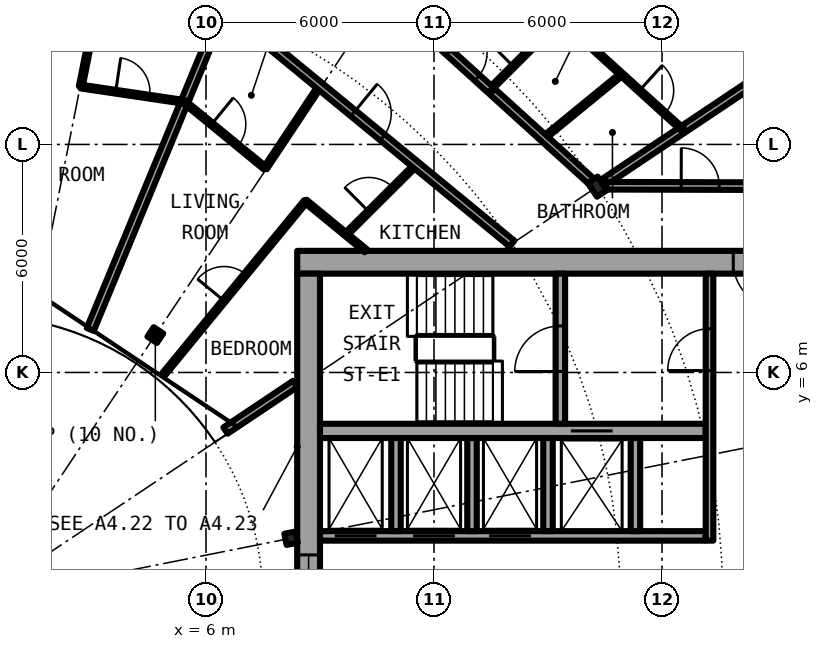
"""IFC4 building model, lengths in metres.
Left out: names, types, materials, properties, quantities, classifications, styles, units other than length and angle.
Written with IfcOpenShell. Run it as: python <this file> out.ifc"""

import sys

from ifc_helpers import new_model, si_unit, direction, frame, frame_2d, origin, origin_2d, place, context, subcontext, project, spatial, rectangle, i_section, extrude, element, fill, save


model = new_model("IFC4")
c1 = context("Model", 3, precision=1e-05, world=origin(), true_north=direction((0.0, 1.0)))
c2 = subcontext(c1, "Body", "Model", "MODEL_VIEW")
j1 = project(units=[si_unit("LENGTHUNIT", "METRE"), si_unit("PLANEANGLEUNIT", "RADIAN")], contexts=[c1])
p1 = place(None, origin())
s1 = spatial("IfcSite", under=j1, at=p1, CompositionType="ELEMENT")
p2 = place(p1, origin())
s2 = spatial("IfcBuilding", under=s1, at=p2, CompositionType="ELEMENT")
p3 = place(p2, frame((0.0, 0.0, 129.95)))
s3 = spatial("IfcBuildingStorey", under=s2, at=p3, CompositionType="ELEMENT", Elevation=129.95)
p4 = place(p3, frame((16.297, 10.889, 0.0), z_axis=(0.0, 0.0, 1.0), x_axis=(0.831469612303, 0.55557023302, 0.0)))
e1 = element("IfcColumn", 1, at=p4, inside=s3, PredefinedType="COLUMN", context=c2, shape_type="SweptSolid", body=[
    extrude(i_section(OverallWidth=0.307, OverallDepth=0.432, WebThickness=0.021, FlangeThickness=0.04, FilletRadius=0.027, at=origin_2d()), origin(), (0.0, 0.0, 1.0), 3.05),
])
for number, where, z_axis, x_axis in (
    (2, (8.239, 1.639, 0.0), (0.0, 0.0, 1.0), (0.981, 0.195, 0.0)),
    (3, (4.667, 6.984, 0.0), (0.0, 0.0, 1.0), (0.556, 0.831, 0.0)),
):
    element("IfcColumn", number, at=place(p3, frame(where, z_axis=z_axis, x_axis=x_axis)), inside=s3, PredefinedType="COLUMN", context=c2, shape_type="SweptSolid", body=[
        extrude(i_section(OverallWidth=0.3, OverallDepth=0.3, WebThickness=0.011, FlangeThickness=0.019, FilletRadius=0.027, at=origin_2d()), origin(), (0.0, 0.0, 1.0), 3.05),
    ])
p5 = place(p3, frame((22.2, 8.9, 0.0), z_axis=(0.0, 0.0, 1.0), x_axis=(-1.0, 0.0, 0.0)))
e4 = element("IfcWall", 4, at=p5, inside=s3, PredefinedType="SHEAR", context=c2, shape_type="SweptSolid", body=[
    extrude(rectangle(XDim=13.8, YDim=0.6, at=frame_2d((6.9, 0.0))), origin(), (0.0, 0.0, 1.0), 3.05),
])
p6 = place(p5, frame((1.125, 0.0, 0.0)))
e5 = element("IfcOpeningElement", 5, at=p6, cuts=e4, PredefinedType="OPENING", context=c2, shape_type="SweptSolid", body=[
    extrude(rectangle(XDim=1.2, YDim=2.3, at=frame_2d((0.6, 1.15))), frame((0.0, 0.31, 0.0), z_axis=(0.0, -1.0, 0.0), x_axis=(1.0, 0.0, 0.0)), (0.0, 0.0, 1.0), 0.62),
])
p7 = place(p3, frame((8.7, -8.6, 0.0), z_axis=(0.0, 0.0, 1.0), x_axis=(0.0, 1.0, 0.0)))
e6 = element("IfcWall", 6, at=p7, inside=s3, PredefinedType="SHEAR", context=c2, shape_type="SweptSolid", body=[
    extrude(rectangle(XDim=17.2, YDim=0.6, at=frame_2d((8.6, 0.0))), origin(), (0.0, 0.0, 1.0), 3.05),
])
p8 = place(p7, frame((7.4, 0.0, 0.1)))
e7 = element("IfcOpeningElement", 7, at=p8, cuts=e6, PredefinedType="OPENING", context=c2, shape_type="SweptSolid", body=[
    extrude(rectangle(XDim=2.4, YDim=2.2, at=frame_2d((1.2, 1.1))), frame((0.0, 0.31, 0.0), z_axis=(0.0, -1.0, 0.0), x_axis=(1.0, 0.0, 0.0)), (0.0, 0.0, 1.0), 0.62),
])
p9 = place(p3, frame((9.0, 1.7, 0.0), z_axis=(0.0, 0.0, 1.0), x_axis=(1.0, 0.0, 0.0)))
e8 = element("IfcWall", 8, at=p9, inside=s3, PredefinedType="SHEAR", context=c2, shape_type="SweptSolid", body=[
    extrude(rectangle(XDim=10.15, YDim=0.25, at=frame_2d((5.075, 0.0))), origin(), (0.0, 0.0, 1.0), 3.05),
])
p10 = place(p9, frame((0.387, 0.0, 0.0)))
e9 = element("IfcOpeningElement", 9, at=p10, cuts=e8, PredefinedType="OPENING", context=c2, shape_type="SweptSolid", body=[
    extrude(rectangle(XDim=1.1, YDim=2.3, at=frame_2d((0.55, 1.15))), frame((0.0, 0.135, 0.0), z_axis=(0.0, -1.0, 0.0), x_axis=(1.0, 0.0, 0.0)), (0.0, 0.0, 1.0), 0.27),
])
p11 = place(p9, frame((2.45, 0.0, 0.0)))
e10 = element("IfcOpeningElement", 10, at=p11, cuts=e8, PredefinedType="OPENING", context=c2, shape_type="SweptSolid", body=[
    extrude(rectangle(XDim=1.1, YDim=2.3, at=frame_2d((0.55, 1.15))), frame((0.0, 0.135, 0.0), z_axis=(0.0, -1.0, 0.0), x_axis=(1.0, 0.0, 0.0)), (0.0, 0.0, 1.0), 0.27),
])
p12 = place(p9, frame((4.45, 0.0, 0.0)))
e11 = element("IfcOpeningElement", 11, at=p12, cuts=e8, PredefinedType="OPENING", context=c2, shape_type="SweptSolid", body=[
    extrude(rectangle(XDim=1.1, YDim=2.3, at=frame_2d((0.55, 1.15))), frame((0.0, 0.135, 0.0), z_axis=(0.0, -1.0, 0.0), x_axis=(1.0, 0.0, 0.0)), (0.0, 0.0, 1.0), 0.27),
])
p13 = place(p3, frame((9.0, 4.462, 0.0), z_axis=(0.0, 0.0, 1.0), x_axis=(1.0, 0.0, 0.0)))
e12 = element("IfcWall", 12, at=p13, inside=s3, PredefinedType="SHEAR", context=c2, shape_type="SweptSolid", body=[
    extrude(rectangle(XDim=10.15, YDim=0.375, at=frame_2d((5.075, 0.0))), origin(), (0.0, 0.0, 1.0), 3.05),
])
p14 = place(p13, frame((6.6, 0.0, 0.0)))
e13 = element("IfcOpeningElement", 13, at=p14, cuts=e12, PredefinedType="OPENING", context=c2, shape_type="SweptSolid", body=[
    extrude(rectangle(XDim=1.1, YDim=2.3, at=frame_2d((0.55, 1.15))), frame((0.0, 0.198, 0.0), z_axis=(0.0, -1.0, 0.0), x_axis=(1.0, 0.0, 0.0)), (0.0, 0.0, 1.0), 0.395),
])
p15 = place(p3, frame((15.325, 4.65, 0.0), z_axis=(0.0, 0.0, 1.0), x_axis=(0.0, 1.0, 0.0)))
e14 = element("IfcWall", 14, at=p15, inside=s3, PredefinedType="SHEAR", context=c2, shape_type="SweptSolid", body=[
    extrude(rectangle(XDim=3.95, YDim=0.25, at=frame_2d((1.975, 0.0))), origin(), (0.0, 0.0, 1.0), 3.05),
])
p16 = place(p15, frame((1.375, 0.0, 0.0)))
e15 = element("IfcOpeningElement", 15, at=p16, cuts=e14, PredefinedType="OPENING", context=c2, shape_type="SweptSolid", body=[
    extrude(rectangle(XDim=1.2, YDim=2.3, at=frame_2d((0.6, 1.15))), frame((0.0, 0.135, 0.0), z_axis=(0.0, -1.0, 0.0), x_axis=(1.0, 0.0, 0.0)), (0.0, 0.0, 1.0), 0.27),
])
for number, where, z_axis, x_axis in (
    (16, (15.0, 1.825, 0.0), (0.0, 0.0, 1.0), (0.0, 1.0, 0.0)),
    (17, (17.3, 1.825, 0.0), (0.0, 0.0, 1.0), (0.0, 1.0, 0.0)),
):
    element("IfcWall", number, at=place(p3, frame(where, z_axis=z_axis, x_axis=x_axis)), inside=s3, PredefinedType="SOLIDWALL", context=c2, shape_type="SweptSolid", body=[
        extrude(rectangle(XDim=2.45, YDim=0.25, at=frame_2d((1.225, 0.0))), origin(), (0.0, 0.0, 1.0), 2.7),
    ])
p17 = place(p3, frame((19.25, 1.575, 0.0), z_axis=(0.0, 0.0, 1.0), x_axis=(0.0, 1.0, 0.0)))
e18 = element("IfcWall", 18, at=p17, inside=s3, PredefinedType="SOLIDWALL", context=c2, shape_type="SweptSolid", body=[
    extrude(rectangle(XDim=7.025, YDim=0.2, at=frame_2d((3.513, 0.0))), origin(), (0.0, 0.0, 1.0), 2.7),
])
p18 = place(p17, frame((4.475, 0.0, 0.0)))
e19 = element("IfcOpeningElement", 19, at=p18, cuts=e18, PredefinedType="OPENING", context=c2, shape_type="SweptSolid", body=[
    extrude(rectangle(XDim=1.1, YDim=2.3, at=frame_2d((0.55, 1.15))), frame((0.0, 0.11, 0.0), z_axis=(0.0, -1.0, 0.0), x_axis=(1.0, 0.0, 0.0)), (0.0, 0.0, 1.0), 0.22),
])
for number, where, z_axis, x_axis in (
    (20, (11.0, 1.825, 0.0), (0.0, 0.0, 1.0), (0.0, 1.0, 0.0)),
    (21, (13.0, 1.825, 0.0), (0.0, 0.0, 1.0), (0.0, 1.0, 0.0)),
):
    element("IfcWall", number, at=place(p3, frame(where, z_axis=z_axis, x_axis=x_axis)), inside=s3, PredefinedType="SOLIDWALL", context=c2, shape_type="SweptSolid", body=[
        extrude(rectangle(XDim=2.45, YDim=0.25, at=frame_2d((1.225, 0.0))), origin(), (0.0, 0.0, 1.0), 2.7),
    ])
p19 = place(p3, frame((2.704, 13.524, 0.0), z_axis=(0.0, 0.0, 1.0), x_axis=(0.195937128464, 0.980616460034, 0.0)))
e22 = element("IfcWall", 22, at=p19, inside=s3, PredefinedType="PARTITIONING", context=c2, shape_type="SweptSolid", body=[
    extrude(rectangle(XDim=2.623, YDim=0.1, at=frame_2d((1.312, 0.0))), origin(), (0.0, 0.0, 1.0), 2.7),
])
p20 = place(p3, frame((2.955, 7.132, 0.0), z_axis=(0.0, 0.0, 1.0), x_axis=(0.382556139466, 0.923932248683, 0.0)))
e23 = element("IfcWall", 23, at=p20, inside=s3, PredefinedType="PARTITIONING", context=c2, shape_type="SweptSolid", body=[
    extrude(rectangle(XDim=9.18, YDim=0.2, at=frame_2d((4.59, 0.0))), origin(), (0.0, 0.0, 1.0), 2.7),
])
p21 = place(p3, frame((4.899, 5.967, 0.0), z_axis=(0.0, 0.0, 1.0), x_axis=(0.634358693064, 0.773038840249, 0.0)))
e24 = element("IfcWall", 24, at=p21, inside=s3, PredefinedType="PARTITIONING", context=c2, shape_type="SweptSolid", body=[
    extrude(rectangle(XDim=5.868, YDim=0.1, at=frame_2d((2.934, 0.0))), origin(), (0.0, 0.0, 1.0), 2.7),
])
p22 = place(p21, frame((2.484, 0.0, 0.0)))
e25 = element("IfcOpeningElement", 25, at=p22, cuts=e24, PredefinedType="OPENING", context=c2, shape_type="SweptSolid", body=[
    extrude(rectangle(XDim=0.9, YDim=2.3, at=frame_2d((0.45, 1.15))), frame((0.0, 0.06, 0.0), z_axis=(0.0, -1.0, 0.0), x_axis=(1.0, 0.0, 0.0)), (0.0, 0.0, 1.0), 0.12),
])
p23 = place(p3, frame((7.56, 11.375, 0.0), z_axis=(0.0, 0.0, 1.0), x_axis=(0.553354377247, 0.83294593653, 0.0)))
e26 = element("IfcWall", 26, at=p23, inside=s3, PredefinedType="PARTITIONING", context=c2, shape_type="SweptSolid", body=[
    extrude(rectangle(XDim=2.597, YDim=0.1, at=frame_2d((1.298, 0.0))), origin(), (0.0, 0.0, 1.0), 2.7),
])
p24 = place(p3, frame((9.683, 9.632, 0.0), z_axis=(0.0, 0.0, 1.0), x_axis=(0.708796844581, 0.705412668665, 0.0)))
e27 = element("IfcWall", 27, at=p24, inside=s3, PredefinedType="PARTITIONING", context=c2, shape_type="SweptSolid", body=[
    extrude(rectangle(XDim=2.597, YDim=0.1, at=frame_2d((1.299, 0.0))), origin(), (0.0, 0.0, 1.0), 2.7),
])
p25 = place(p24, frame((0.849, 0.0, 0.0)))
e28 = element("IfcOpeningElement", 28, at=p25, cuts=e27, PredefinedType="OPENING", context=c2, shape_type="SweptSolid", body=[
    extrude(rectangle(XDim=0.9, YDim=2.3, at=frame_2d((0.45, 1.15))), frame((0.0, 0.06, 0.0), z_axis=(0.0, -1.0, 0.0), x_axis=(1.0, 0.0, 0.0)), (0.0, 0.0, 1.0), 0.12),
])
p26 = place(p3, frame((13.474, 13.448, 0.0), z_axis=(0.0, 0.0, 1.0), x_axis=(0.707851299421, 0.706361478217, 0.0)))
e29 = element("IfcWall", 29, at=p26, inside=s3, PredefinedType="PARTITIONING", context=c2, shape_type="SweptSolid", body=[
    extrude(rectangle(XDim=2.622, YDim=0.1, at=frame_2d((1.311, 0.0))), origin(), (0.0, 0.0, 1.0), 2.7),
])
p27 = place(p26, frame((0.861, 0.0, 0.0)))
e30 = element("IfcOpeningElement", 30, at=p27, cuts=e29, PredefinedType="OPENING", context=c2, shape_type="SweptSolid", body=[
    extrude(rectangle(XDim=0.9, YDim=2.3, at=frame_2d((0.45, 1.15))), frame((0.0, 0.06, 0.0), z_axis=(0.0, -1.0, 0.0), x_axis=(1.0, 0.0, 0.0)), (0.0, 0.0, 1.0), 0.12),
])
p28 = place(p3, frame((14.885, 12.168, 0.0), z_axis=(0.0, 0.0, 1.0), x_axis=(0.774162545943, 0.632986850147, 0.0)))
e31 = element("IfcWall", 31, at=p28, inside=s3, PredefinedType="PARTITIONING", context=c2, shape_type="SweptSolid", body=[
    extrude(rectangle(XDim=2.649, YDim=0.1, at=frame_2d((1.325, 0.0))), origin(), (0.0, 0.0, 1.0), 2.7),
])
p29 = place(p3, frame((16.477, 11.009, 0.0), z_axis=(0.0, 0.0, 1.0), x_axis=(0.831406593008, 0.555664536482, 0.0)))
e32 = element("IfcWall", 32, at=p29, inside=s3, PredefinedType="PARTITIONING", context=c2, shape_type="SweptSolid", body=[
    extrude(rectangle(XDim=7.358, YDim=0.2, at=frame_2d((3.679, 0.0))), origin(), (0.0, 0.0, 1.0), 2.7),
])
p30 = place(p3, frame((6.513, 4.472, 0.0), z_axis=(0.0, 0.0, 1.0), x_axis=(0.831333375071, 0.555774072347, 0.0)))
e33 = element("IfcWall", 33, at=p30, inside=s3, PredefinedType="PARTITIONING", context=c2, shape_type="SweptSolid", body=[
    extrude(rectangle(XDim=2.203, YDim=0.2, at=frame_2d((1.101, 0.0))), origin(), (0.0, 0.0, 1.0), 2.7),
])
p31 = place(p3, frame((16.54, 10.913, 0.0), z_axis=(0.0, 0.0, 1.0), x_axis=(0.99999670426, -0.002567385634, 0.0)))
e34 = element("IfcWall", 34, at=p31, inside=s3, PredefinedType="PARTITIONING", context=c2, shape_type="SweptSolid", body=[
    extrude(rectangle(XDim=5.135, YDim=0.2, at=frame_2d((2.567, 0.0))), origin(), (0.0, 0.0, 1.0), 2.7),
])
p32 = place(p31, frame((1.965, 0.0, 0.0)))
e35 = element("IfcOpeningElement", 35, at=p32, cuts=e34, PredefinedType="OPENING", context=c2, shape_type="SweptSolid", body=[
    extrude(rectangle(XDim=1.0, YDim=2.3, at=frame_2d((0.5, 1.15))), frame((0.0, 0.11, 0.0), z_axis=(0.0, -1.0, 0.0), x_axis=(1.0, 0.0, 0.0)), (0.0, 0.0, 1.0), 0.22),
])
p33 = place(p3, frame((5.431, 13.12, 0.0), z_axis=(0.0, 0.0, 1.0), x_axis=(0.773149312811, -0.634224045665, 0.0)))
e36 = element("IfcWall", 36, at=p33, inside=s3, PredefinedType="PARTITIONING", context=c2, shape_type="SweptSolid", body=[
    extrude(rectangle(XDim=2.749, YDim=0.1, at=frame_2d((1.374, 0.0))), origin(), (0.0, 0.0, 1.0), 2.7),
])
p34 = place(p33, frame((0.927, 0.0, 0.0)))
e37 = element("IfcOpeningElement", 37, at=p34, cuts=e36, PredefinedType="OPENING", context=c2, shape_type="SweptSolid", body=[
    extrude(rectangle(XDim=0.9, YDim=2.3, at=frame_2d((0.45, 1.15))), frame((0.0, 0.06, 0.0), z_axis=(0.0, -1.0, 0.0), x_axis=(1.0, 0.0, 0.0)), (0.0, 0.0, 1.0), 0.12),
])
p35 = place(p3, frame((8.618, 10.506, 0.0), z_axis=(0.0, 0.0, 1.0), x_axis=(0.772998703631, -0.634407600983, 0.0)))
e38 = element("IfcWall", 38, at=p35, inside=s3, PredefinedType="PARTITIONING", context=c2, shape_type="SweptSolid", body=[
    extrude(rectangle(XDim=2.056, YDim=0.1, at=frame_2d((1.028, 0.0))), origin(), (0.0, 0.0, 1.0), 2.7),
])
p36 = place(p3, frame((2.707, 13.523, 0.0), z_axis=(0.0, 0.0, 1.0), x_axis=(0.98916494308, -0.146808430897, 0.0)))
e39 = element("IfcWall", 39, at=p36, inside=s3, PredefinedType="PARTITIONING", context=c2, shape_type="SweptSolid", body=[
    extrude(rectangle(XDim=2.759, YDim=0.1, at=frame_2d((1.379, 0.0))), origin(), (0.0, 0.0, 1.0), 2.7),
])
p37 = place(p36, frame((0.927, 0.0, 0.0)))
e40 = element("IfcOpeningElement", 40, at=p37, cuts=e39, PredefinedType="OPENING", context=c2, shape_type="SweptSolid", body=[
    extrude(rectangle(XDim=0.9, YDim=2.3, at=frame_2d((0.45, 1.15))), frame((0.0, 0.06, 0.0), z_axis=(0.0, -1.0, 0.0), x_axis=(1.0, 0.0, 0.0)), (0.0, 0.0, 1.0), 0.12),
])
p38 = place(p3, frame((6.47, 15.613, 0.0), z_axis=(0.0, 0.0, 1.0), x_axis=(0.77292501819, -0.634497372931, 0.0)))
e41 = element("IfcWall", 41, at=p38, inside=s3, PredefinedType="PARTITIONING", context=c2, shape_type="SweptSolid", body=[
    extrude(rectangle(XDim=9.81, YDim=0.2, at=frame_2d((4.905, 0.0))), origin(), (0.0, 0.0, 1.0), 2.7),
])
p39 = place(p38, frame((4.404, 0.0, 0.0)))
e42 = element("IfcOpeningElement", 42, at=p39, cuts=e41, PredefinedType="OPENING", context=c2, shape_type="SweptSolid", body=[
    extrude(rectangle(XDim=1.0, YDim=2.3, at=frame_2d((0.5, 1.15))), frame((0.0, 0.11, 0.0), z_axis=(0.0, -1.0, 0.0), x_axis=(1.0, 0.0, 0.0)), (0.0, 0.0, 1.0), 0.22),
])
p40 = place(p3, frame((9.232, 17.289, 0.0), z_axis=(0.0, 0.0, 1.0), x_axis=(0.741112328493, -0.67138105168, 0.0)))
e43 = element("IfcWall", 43, at=p40, inside=s3, PredefinedType="PARTITIONING", context=c2, shape_type="SweptSolid", body=[
    extrude(rectangle(XDim=5.752, YDim=0.2, at=frame_2d((2.876, 0.0))), origin(), (0.0, 0.0, 1.0), 2.7),
])
p41 = place(p40, frame((4.27, 0.0, 0.0)))
e44 = element("IfcOpeningElement", 44, at=p41, cuts=e43, PredefinedType="OPENING", context=c2, shape_type="SweptSolid", body=[
    extrude(rectangle(XDim=1.0, YDim=2.3, at=frame_2d((0.5, 1.15))), frame((0.0, 0.11, 0.0), z_axis=(0.0, -1.0, 0.0), x_axis=(1.0, 0.0, 0.0)), (0.0, 0.0, 1.0), 0.22),
])
p42 = place(p3, frame((13.531, 13.394, 0.0), z_axis=(0.0, 0.0, 1.0), x_axis=(0.741095315462, -0.671399831249, 0.0)))
e45 = element("IfcWall", 45, at=p42, inside=s3, PredefinedType="PARTITIONING", context=c2, shape_type="SweptSolid", body=[
    extrude(rectangle(XDim=3.573, YDim=0.2, at=frame_2d((1.787, 0.0))), origin(), (0.0, 0.0, 1.0), 2.39),
])
p43 = place(p3, frame((15.33, 15.3, 0.0), z_axis=(0.0, 0.0, 1.0), x_axis=(0.740948416939, -0.671561943112, 0.0)))
e46 = element("IfcWall", 46, at=p43, inside=s3, PredefinedType="PARTITIONING", context=c2, shape_type="SweptSolid", body=[
    extrude(rectangle(XDim=4.335, YDim=0.1, at=frame_2d((2.167, 0.0))), origin(), (0.0, 0.0, 1.0), 2.7),
])
p44 = place(p43, frame((2.803, 0.0, 0.0)))
e47 = element("IfcOpeningElement", 47, at=p44, cuts=e46, PredefinedType="OPENING", context=c2, shape_type="SweptSolid", body=[
    extrude(rectangle(XDim=0.9, YDim=2.3, at=frame_2d((0.45, 1.15))), frame((0.0, 0.06, 0.0), z_axis=(0.0, -1.0, 0.0), x_axis=(1.0, 0.0, 0.0)), (0.0, 0.0, 1.0), 0.12),
])
p45 = place(p10, origin())
e48 = element("IfcDoor", 48, at=p45, inside=s3, OperationType="DOUBLE_DOOR_SLIDING", PredefinedType="DOOR", context=c2, shape_type="SweptSolid", body=[
    extrude(rectangle(XDim=1.1, YDim=2.3, at=frame_2d((0.55, 1.15))), frame((0.0, 0.025, 0.0), z_axis=(0.0, -1.0, 0.0), x_axis=(1.0, 0.0, 0.0)), (0.0, 0.0, 1.0), 0.05),
])
fill(e9, e48)
p46 = place(p11, origin())
e49 = element("IfcDoor", 49, at=p46, inside=s3, OperationType="DOUBLE_DOOR_SLIDING", PredefinedType="DOOR", context=c2, shape_type="SweptSolid", body=[
    extrude(rectangle(XDim=1.1, YDim=2.3, at=frame_2d((0.55, 1.15))), frame((0.0, 0.025, 0.0), z_axis=(0.0, -1.0, 0.0), x_axis=(1.0, 0.0, 0.0)), (0.0, 0.0, 1.0), 0.05),
])
fill(e10, e49)
p47 = place(p12, origin())
e50 = element("IfcDoor", 50, at=p47, inside=s3, OperationType="DOUBLE_DOOR_SLIDING", PredefinedType="DOOR", context=c2, shape_type="SweptSolid", body=[
    extrude(rectangle(XDim=1.1, YDim=2.3, at=frame_2d((0.55, 1.15))), frame((0.0, 0.025, 0.0), z_axis=(0.0, -1.0, 0.0), x_axis=(1.0, 0.0, 0.0)), (0.0, 0.0, 1.0), 0.05),
])
fill(e11, e50)
p48 = place(p14, origin())
e51 = element("IfcDoor", 51, at=p48, inside=s3, OperationType="DOUBLE_DOOR_SLIDING", PredefinedType="DOOR", context=c2, shape_type="SweptSolid", body=[
    extrude(rectangle(XDim=1.1, YDim=2.3, at=frame_2d((0.55, 1.15))), frame((0.0, 0.025, 0.0), z_axis=(0.0, -1.0, 0.0), x_axis=(1.0, 0.0, 0.0)), (0.0, 0.0, 1.0), 0.05),
])
fill(e13, e51)
p49 = place(p16, origin())
e52 = element("IfcDoor", 52, at=p49, inside=s3, OperationType="SINGLE_SWING_LEFT", PredefinedType="DOOR", context=c2, shape_type="SweptSolid", body=[
    extrude(rectangle(XDim=1.2, YDim=2.3, at=frame_2d((0.6, 1.15))), frame((0.0, 0.025, 0.0), z_axis=(0.0, -1.0, 0.0), x_axis=(1.0, 0.0, 0.0)), (0.0, 0.0, 1.0), 0.05),
])
fill(e15, e52)
p50 = place(p18, origin())
e53 = element("IfcDoor", 53, at=p50, inside=s3, OperationType="SINGLE_SWING_LEFT", PredefinedType="DOOR", context=c2, shape_type="SweptSolid", body=[
    extrude(rectangle(XDim=1.1, YDim=2.3, at=frame_2d((0.55, 1.15))), frame((0.0, 0.025, 0.0), z_axis=(0.0, -1.0, 0.0), x_axis=(1.0, 0.0, 0.0)), (0.0, 0.0, 1.0), 0.05),
])
fill(e19, e53)
p51 = place(p6, origin())
e54 = element("IfcDoor", 54, at=p51, inside=s3, OperationType="SINGLE_SWING_RIGHT", PredefinedType="DOOR", context=c2, shape_type="SweptSolid", body=[
    extrude(rectangle(XDim=1.2, YDim=2.3, at=frame_2d((0.6, 1.15))), frame((0.0, 0.025, 0.0), z_axis=(0.0, -1.0, 0.0), x_axis=(1.0, 0.0, 0.0)), (0.0, 0.0, 1.0), 0.05),
])
fill(e5, e54)
p52 = place(p8, origin())
e55 = element("IfcWindow", 55, at=p52, inside=s3, PartitioningType="SINGLE_PANEL", PredefinedType="WINDOW", context=c2, shape_type="SweptSolid", body=[
    extrude(rectangle(XDim=2.4, YDim=2.2, at=frame_2d((1.2, 1.1))), frame((0.0, 0.03, 0.0), z_axis=(0.0, -1.0, 0.0), x_axis=(1.0, 0.0, 0.0)), (0.0, 0.0, 1.0), 0.06),
])
fill(e7, e55)
p53 = place(p41, origin())
e56 = element("IfcDoor", 56, at=p53, inside=s3, OperationType="SINGLE_SWING_RIGHT", PredefinedType="DOOR", context=c2, shape_type="SweptSolid", body=[
    extrude(rectangle(XDim=1.0, YDim=2.3, at=frame_2d((0.5, 1.15))), frame((0.0, 0.025, 0.0), z_axis=(0.0, -1.0, 0.0), x_axis=(1.0, 0.0, 0.0)), (0.0, 0.0, 1.0), 0.05),
])
fill(e44, e56)
p54 = place(p44, origin())
e57 = element("IfcDoor", 57, at=p54, inside=s3, OperationType="SINGLE_SWING_RIGHT", PredefinedType="DOOR", context=c2, shape_type="SweptSolid", body=[
    extrude(rectangle(XDim=0.9, YDim=2.3, at=frame_2d((0.45, 1.15))), frame((0.0, 0.025, 0.0), z_axis=(0.0, -1.0, 0.0), x_axis=(1.0, 0.0, 0.0)), (0.0, 0.0, 1.0), 0.05),
])
fill(e47, e57)
p55 = place(p27, origin())
e58 = element("IfcDoor", 58, at=p55, inside=s3, OperationType="SINGLE_SWING_LEFT", PredefinedType="DOOR", context=c2, shape_type="SweptSolid", body=[
    extrude(rectangle(XDim=0.9, YDim=2.3, at=frame_2d((0.45, 1.15))), frame((0.0, 0.025, 0.0), z_axis=(0.0, -1.0, 0.0), x_axis=(1.0, 0.0, 0.0)), (0.0, 0.0, 1.0), 0.05),
])
fill(e30, e58)
p56 = place(p39, origin())
e59 = element("IfcDoor", 59, at=p56, inside=s3, OperationType="SINGLE_SWING_LEFT", PredefinedType="DOOR", context=c2, shape_type="SweptSolid", body=[
    extrude(rectangle(XDim=1.0, YDim=2.3, at=frame_2d((0.5, 1.15))), frame((0.0, 0.025, 0.0), z_axis=(0.0, -1.0, 0.0), x_axis=(1.0, 0.0, 0.0)), (0.0, 0.0, 1.0), 0.05),
])
fill(e42, e59)
p57 = place(p34, origin())
e60 = element("IfcDoor", 60, at=p57, inside=s3, OperationType="SINGLE_SWING_RIGHT", PredefinedType="DOOR", context=c2, shape_type="SweptSolid", body=[
    extrude(rectangle(XDim=0.9, YDim=2.3, at=frame_2d((0.45, 1.15))), frame((0.0, 0.025, 0.0), z_axis=(0.0, -1.0, 0.0), x_axis=(1.0, 0.0, 0.0)), (0.0, 0.0, 1.0), 0.05),
])
fill(e37, e60)
p58 = place(p25, origin())
e61 = element("IfcDoor", 61, at=p58, inside=s3, OperationType="SINGLE_SWING_LEFT", PredefinedType="DOOR", context=c2, shape_type="SweptSolid", body=[
    extrude(rectangle(XDim=0.9, YDim=2.3, at=frame_2d((0.45, 1.15))), frame((0.0, 0.025, 0.0), z_axis=(0.0, -1.0, 0.0), x_axis=(1.0, 0.0, 0.0)), (0.0, 0.0, 1.0), 0.05),
])
fill(e28, e61)
p59 = place(p22, origin())
e62 = element("IfcDoor", 62, at=p59, inside=s3, OperationType="SINGLE_SWING_RIGHT", PredefinedType="DOOR", context=c2, shape_type="SweptSolid", body=[
    extrude(rectangle(XDim=0.9, YDim=2.3, at=frame_2d((0.45, 1.15))), frame((0.0, 0.025, 0.0), z_axis=(0.0, -1.0, 0.0), x_axis=(1.0, 0.0, 0.0)), (0.0, 0.0, 1.0), 0.05),
])
fill(e25, e62)
p60 = place(p37, origin())
e63 = element("IfcDoor", 63, at=p60, inside=s3, OperationType="SINGLE_SWING_LEFT", PredefinedType="DOOR", context=c2, shape_type="SweptSolid", body=[
    extrude(rectangle(XDim=0.9, YDim=2.3, at=frame_2d((0.45, 1.15))), frame((0.0, 0.025, 0.0), z_axis=(0.0, -1.0, 0.0), x_axis=(1.0, 0.0, 0.0)), (0.0, 0.0, 1.0), 0.05),
])
fill(e40, e63)
p61 = place(p32, origin())
e64 = element("IfcDoor", 64, at=p61, inside=s3, OperationType="SINGLE_SWING_LEFT", PredefinedType="DOOR", context=c2, shape_type="SweptSolid", body=[
    extrude(rectangle(XDim=1.0, YDim=2.3, at=frame_2d((0.5, 1.15))), frame((0.0, 0.025, 0.0), z_axis=(0.0, -1.0, 0.0), x_axis=(1.0, 0.0, 0.0)), (0.0, 0.0, 1.0), 0.05),
])
fill(e35, e64)
save(model, sys.argv[1])
